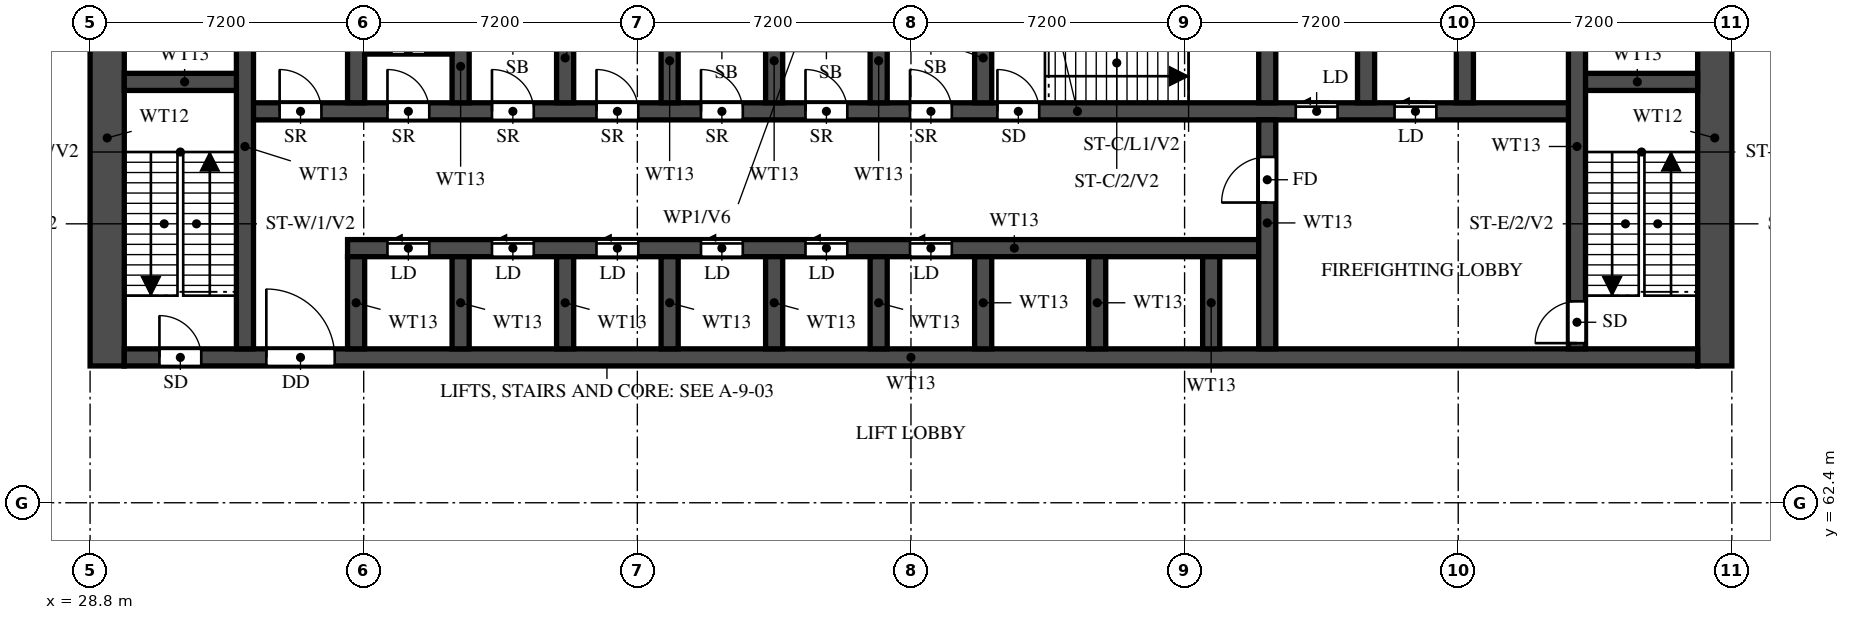
"""IFC4 building model, lengths in metres.
Left out: names, types, materials, properties, quantities, classifications, styles, units other than length and angle.
Written with IfcOpenShell. Run it as: python <this file> out.ifc"""

import sys

from ifc_helpers import new_model, si_unit, direction, frame, frame_2d, origin, place, context, subcontext, project, spatial, rectangle, extrude, element, fill, save


model = new_model("IFC4")
c1 = context("Model", 3, precision=1e-05, world=origin(), true_north=direction((0.0, 1.0)))
c2 = subcontext(c1, "Body", "Model", "MODEL_VIEW")
j1 = project(units=[si_unit("LENGTHUNIT", "METRE"), si_unit("PLANEANGLEUNIT", "RADIAN")], contexts=[c1])
p1 = place(None, origin())
s1 = spatial("IfcSite", under=j1, at=p1, CompositionType="ELEMENT")
p2 = place(p1, origin())
s2 = spatial("IfcBuilding", under=s1, at=p2, CompositionType="ELEMENT")
p3 = place(p2, frame((0.0, 0.0, 7.8)))
s3 = spatial("IfcBuildingStorey", under=s2, at=p3, CompositionType="ELEMENT", Elevation=7.8)
for number, where, z_axis, x_axis in (
    (1, (29.25, 66.0, 0.0), (0.0, 0.0, 1.0), (0.0, 1.0, 0.0)),
    (2, (71.55, 66.0, 0.0), (0.0, 0.0, 1.0), (0.0, 1.0, 0.0)),
):
    element("IfcWall", number, at=place(p3, frame(where, z_axis=z_axis, x_axis=x_axis)), inside=s3, PredefinedType="SHEAR", context=c2, shape_type="SweptSolid", body=[
        extrude(rectangle(XDim=12.0, YDim=0.9, at=frame_2d((6.0, 0.0))), origin(), (0.0, 0.0, 1.0), 5.0),
    ])
p4 = place(p3, frame((29.7, 66.225, 0.0), z_axis=(0.0, 0.0, 1.0), x_axis=(1.0, 0.0, 0.0)))
e3 = element("IfcWall", 3, at=p4, inside=s3, PredefinedType="SHEAR", context=c2, shape_type="SweptSolid", body=[
    extrude(rectangle(XDim=41.4, YDim=0.45, at=frame_2d((20.7, 0.0))), origin(), (0.0, 0.0, 1.0), 5.0),
])
p5 = place(p4, frame((0.925, 0.0, 0.0)))
e4 = element("IfcOpeningElement", 4, at=p5, cuts=e3, PredefinedType="OPENING", context=c2, shape_type="SweptSolid", body=[
    extrude(rectangle(XDim=1.1, YDim=2.1, at=frame_2d((0.55, 1.05))), frame((0.0, 0.235, 0.0), z_axis=(0.0, -1.0, 0.0), x_axis=(1.0, 0.0, 0.0)), (0.0, 0.0, 1.0), 0.47),
])
p6 = place(p4, frame((3.738, 0.0, 0.0)))
e5 = element("IfcOpeningElement", 5, at=p6, cuts=e3, PredefinedType="OPENING", context=c2, shape_type="SweptSolid", body=[
    extrude(rectangle(XDim=1.8, YDim=2.1, at=frame_2d((0.9, 1.05))), frame((0.0, 0.235, 0.0), z_axis=(0.0, -1.0, 0.0), x_axis=(1.0, 0.0, 0.0)), (0.0, 0.0, 1.0), 0.47),
])
p7 = place(p3, frame((35.575, 69.1, 0.0), z_axis=(0.0, 0.0, 1.0), x_axis=(1.0, 0.0, 0.0)))
e6 = element("IfcWall", 6, at=p7, inside=s3, PredefinedType="SHEAR", context=c2, shape_type="SweptSolid", body=[
    extrude(rectangle(XDim=24.2, YDim=0.45, at=frame_2d((12.1, 0.0))), origin(), (0.0, 0.0, 1.0), 5.0),
])
p8 = place(p7, frame((1.05, 0.0, 0.0)))
e7 = element("IfcOpeningElement", 7, at=p8, cuts=e6, PredefinedType="OPENING", context=c2, shape_type="SweptSolid", body=[
    extrude(rectangle(XDim=1.1, YDim=2.1, at=frame_2d((0.55, 1.05))), frame((0.0, 0.235, 0.0), z_axis=(0.0, -1.0, 0.0), x_axis=(1.0, 0.0, 0.0)), (0.0, 0.0, 1.0), 0.47),
])
p9 = place(p7, frame((3.8, 0.0, 0.0)))
e8 = element("IfcOpeningElement", 8, at=p9, cuts=e6, PredefinedType="OPENING", context=c2, shape_type="SweptSolid", body=[
    extrude(rectangle(XDim=1.1, YDim=2.1, at=frame_2d((0.55, 1.05))), frame((0.0, 0.235, 0.0), z_axis=(0.0, -1.0, 0.0), x_axis=(1.0, 0.0, 0.0)), (0.0, 0.0, 1.0), 0.47),
])
p10 = place(p7, frame((6.55, 0.0, 0.0)))
e9 = element("IfcOpeningElement", 9, at=p10, cuts=e6, PredefinedType="OPENING", context=c2, shape_type="SweptSolid", body=[
    extrude(rectangle(XDim=1.1, YDim=2.1, at=frame_2d((0.55, 1.05))), frame((0.0, 0.235, 0.0), z_axis=(0.0, -1.0, 0.0), x_axis=(1.0, 0.0, 0.0)), (0.0, 0.0, 1.0), 0.47),
])
p11 = place(p7, frame((9.3, 0.0, 0.0)))
e10 = element("IfcOpeningElement", 10, at=p11, cuts=e6, PredefinedType="OPENING", context=c2, shape_type="SweptSolid", body=[
    extrude(rectangle(XDim=1.1, YDim=2.1, at=frame_2d((0.55, 1.05))), frame((0.0, 0.235, 0.0), z_axis=(0.0, -1.0, 0.0), x_axis=(1.0, 0.0, 0.0)), (0.0, 0.0, 1.0), 0.47),
])
p12 = place(p7, frame((12.05, 0.0, 0.0)))
e11 = element("IfcOpeningElement", 11, at=p12, cuts=e6, PredefinedType="OPENING", context=c2, shape_type="SweptSolid", body=[
    extrude(rectangle(XDim=1.1, YDim=2.1, at=frame_2d((0.55, 1.05))), frame((0.0, 0.235, 0.0), z_axis=(0.0, -1.0, 0.0), x_axis=(1.0, 0.0, 0.0)), (0.0, 0.0, 1.0), 0.47),
])
p13 = place(p7, frame((14.8, 0.0, 0.0)))
e12 = element("IfcOpeningElement", 12, at=p13, cuts=e6, PredefinedType="OPENING", context=c2, shape_type="SweptSolid", body=[
    extrude(rectangle(XDim=1.1, YDim=2.1, at=frame_2d((0.55, 1.05))), frame((0.0, 0.235, 0.0), z_axis=(0.0, -1.0, 0.0), x_axis=(1.0, 0.0, 0.0)), (0.0, 0.0, 1.0), 0.47),
])
p14 = place(p3, frame((32.875, 72.7, 0.0), z_axis=(0.0, 0.0, 1.0), x_axis=(1.0, 0.0, 0.0)))
e13 = element("IfcWall", 13, at=p14, inside=s3, PredefinedType="SHEAR", context=c2, shape_type="SweptSolid", body=[
    extrude(rectangle(XDim=35.05, YDim=0.45, at=frame_2d((17.525, 0.0))), origin(), (0.0, 0.0, 1.0), 5.0),
])
p15 = place(p14, frame((19.8, 0.0, 0.0)))
e14 = element("IfcOpeningElement", 14, at=p15, cuts=e13, PredefinedType="OPENING", context=c2, shape_type="SweptSolid", body=[
    extrude(rectangle(XDim=1.1, YDim=2.1, at=frame_2d((0.55, 1.05))), frame((0.0, 0.235, 0.0), z_axis=(0.0, -1.0, 0.0), x_axis=(1.0, 0.0, 0.0)), (0.0, 0.0, 1.0), 0.47),
])
p16 = place(p14, frame((27.65, 0.0, 0.0)))
e15 = element("IfcOpeningElement", 15, at=p16, cuts=e13, PredefinedType="OPENING", context=c2, shape_type="SweptSolid", body=[
    extrude(rectangle(XDim=1.1, YDim=2.1, at=frame_2d((0.55, 1.05))), frame((0.0, 0.235, 0.0), z_axis=(0.0, -1.0, 0.0), x_axis=(1.0, 0.0, 0.0)), (0.0, 0.0, 1.0), 0.47),
])
p17 = place(p14, frame((30.25, 0.0, 0.0)))
e16 = element("IfcOpeningElement", 16, at=p17, cuts=e13, PredefinedType="OPENING", context=c2, shape_type="SweptSolid", body=[
    extrude(rectangle(XDim=1.1, YDim=2.1, at=frame_2d((0.55, 1.05))), frame((0.0, 0.235, 0.0), z_axis=(0.0, -1.0, 0.0), x_axis=(1.0, 0.0, 0.0)), (0.0, 0.0, 1.0), 0.47),
])
p18 = place(p14, frame((3.75, 0.0, 0.0)))
e17 = element("IfcOpeningElement", 17, at=p18, cuts=e13, PredefinedType="OPENING", context=c2, shape_type="SweptSolid", body=[
    extrude(rectangle(XDim=1.1, YDim=2.1, at=frame_2d((0.55, 1.05))), frame((0.0, 0.235, 0.0), z_axis=(0.0, -1.0, 0.0), x_axis=(1.0, 0.0, 0.0)), (0.0, 0.0, 1.0), 0.47),
])
p19 = place(p14, frame((6.5, 0.0, 0.0)))
e18 = element("IfcOpeningElement", 18, at=p19, cuts=e13, PredefinedType="OPENING", context=c2, shape_type="SweptSolid", body=[
    extrude(rectangle(XDim=1.1, YDim=2.1, at=frame_2d((0.55, 1.05))), frame((0.0, 0.235, 0.0), z_axis=(0.0, -1.0, 0.0), x_axis=(1.0, 0.0, 0.0)), (0.0, 0.0, 1.0), 0.47),
])
p20 = place(p14, frame((9.25, 0.0, 0.0)))
e19 = element("IfcOpeningElement", 19, at=p20, cuts=e13, PredefinedType="OPENING", context=c2, shape_type="SweptSolid", body=[
    extrude(rectangle(XDim=1.1, YDim=2.1, at=frame_2d((0.55, 1.05))), frame((0.0, 0.235, 0.0), z_axis=(0.0, -1.0, 0.0), x_axis=(1.0, 0.0, 0.0)), (0.0, 0.0, 1.0), 0.47),
])
p21 = place(p14, frame((12.0, 0.0, 0.0)))
e20 = element("IfcOpeningElement", 20, at=p21, cuts=e13, PredefinedType="OPENING", context=c2, shape_type="SweptSolid", body=[
    extrude(rectangle(XDim=1.1, YDim=2.1, at=frame_2d((0.55, 1.05))), frame((0.0, 0.235, 0.0), z_axis=(0.0, -1.0, 0.0), x_axis=(1.0, 0.0, 0.0)), (0.0, 0.0, 1.0), 0.47),
])
p22 = place(p14, frame((14.75, 0.0, 0.0)))
e21 = element("IfcOpeningElement", 21, at=p22, cuts=e13, PredefinedType="OPENING", context=c2, shape_type="SweptSolid", body=[
    extrude(rectangle(XDim=1.1, YDim=2.1, at=frame_2d((0.55, 1.05))), frame((0.0, 0.235, 0.0), z_axis=(0.0, -1.0, 0.0), x_axis=(1.0, 0.0, 0.0)), (0.0, 0.0, 1.0), 0.47),
])
p23 = place(p14, frame((17.5, 0.0, 0.0)))
e22 = element("IfcOpeningElement", 22, at=p23, cuts=e13, PredefinedType="OPENING", context=c2, shape_type="SweptSolid", body=[
    extrude(rectangle(XDim=1.1, YDim=2.1, at=frame_2d((0.55, 1.05))), frame((0.0, 0.235, 0.0), z_axis=(0.0, -1.0, 0.0), x_axis=(1.0, 0.0, 0.0)), (0.0, 0.0, 1.0), 0.47),
])
p24 = place(p14, frame((0.913, 0.0, 0.0)))
e23 = element("IfcOpeningElement", 23, at=p24, cuts=e13, PredefinedType="OPENING", context=c2, shape_type="SweptSolid", body=[
    extrude(rectangle(XDim=1.1, YDim=2.1, at=frame_2d((0.55, 1.05))), frame((0.0, 0.235, 0.0), z_axis=(0.0, -1.0, 0.0), x_axis=(1.0, 0.0, 0.0)), (0.0, 0.0, 1.0), 0.47),
])
for number, where, z_axis, x_axis in (
    (24, (29.7, 73.475, 0.0), (0.0, 0.0, 1.0), (1.0, 0.0, 0.0)),
    (25, (67.925, 73.475, 0.0), (0.0, 0.0, 1.0), (1.0, 0.0, 0.0)),
):
    element("IfcWall", number, at=place(p3, frame(where, z_axis=z_axis, x_axis=x_axis)), inside=s3, PredefinedType="SHEAR", context=c2, shape_type="SweptSolid", body=[
        extrude(rectangle(XDim=3.175, YDim=0.45, at=frame_2d((1.587, 0.0))), origin(), (0.0, 0.0, 1.0), 5.0),
    ])
p25 = place(p3, frame((32.875, 66.45, 0.0), z_axis=(0.0, 0.0, 1.0), x_axis=(0.0, 1.0, 0.0)))
e26 = element("IfcWall", 26, at=p25, inside=s3, PredefinedType="SHEAR", context=c2, shape_type="SweptSolid", body=[
    extrude(rectangle(XDim=10.65, YDim=0.45, at=frame_2d((5.325, 0.0))), origin(), (0.0, 0.0, 1.0), 5.0),
])
p26 = place(p3, frame((67.925, 66.45, 0.0), z_axis=(0.0, 0.0, 1.0), x_axis=(0.0, 1.0, 0.0)))
e27 = element("IfcWall", 27, at=p26, inside=s3, PredefinedType="SHEAR", context=c2, shape_type="SweptSolid", body=[
    extrude(rectangle(XDim=10.65, YDim=0.45, at=frame_2d((5.325, 0.0))), origin(), (0.0, 0.0, 1.0), 5.0),
])
p27 = place(p26, frame((0.15, 0.0, 0.0)))
e28 = element("IfcOpeningElement", 28, at=p27, cuts=e27, PredefinedType="OPENING", context=c2, shape_type="SweptSolid", body=[
    extrude(rectangle(XDim=1.1, YDim=2.1, at=frame_2d((0.55, 1.05))), frame((0.0, 0.235, 0.0), z_axis=(0.0, -1.0, 0.0), x_axis=(1.0, 0.0, 0.0)), (0.0, 0.0, 1.0), 0.47),
])
p28 = place(p3, frame((59.775, 66.45, 0.0), z_axis=(0.0, 0.0, 1.0), x_axis=(0.0, 1.0, 0.0)))
e29 = element("IfcWall", 29, at=p28, inside=s3, PredefinedType="SHEAR", context=c2, shape_type="SweptSolid", body=[
    extrude(rectangle(XDim=6.025, YDim=0.45, at=frame_2d((3.013, 0.0))), origin(), (0.0, 0.0, 1.0), 5.0),
])
p29 = place(p28, frame((3.85, 0.0, 0.0)))
e30 = element("IfcOpeningElement", 30, at=p29, cuts=e29, PredefinedType="OPENING", context=c2, shape_type="SweptSolid", body=[
    extrude(rectangle(XDim=1.2, YDim=2.1, at=frame_2d((0.6, 1.05))), frame((0.0, 0.235, 0.0), z_axis=(0.0, -1.0, 0.0), x_axis=(1.0, 0.0, 0.0)), (0.0, 0.0, 1.0), 0.47),
])
p30 = place(p3, frame((59.775, 72.925, 0.0), z_axis=(0.0, 0.0, 1.0), x_axis=(0.0, 1.0, 0.0)))
e31 = element("IfcWall", 31, at=p30, inside=s3, PredefinedType="SHEAR", context=c2, shape_type="SweptSolid", body=[
    extrude(rectangle(XDim=2.95, YDim=0.45, at=frame_2d((1.475, 0.0))), origin(), (0.0, 0.0, 1.0), 5.0),
])
for number, where, z_axis, x_axis in (
    (32, (35.8, 66.45, 0.0), (0.0, 0.0, 1.0), (0.0, 1.0, 0.0)),
    (33, (38.55, 66.45, 0.0), (0.0, 0.0, 1.0), (0.0, 1.0, 0.0)),
    (34, (41.3, 66.45, 0.0), (0.0, 0.0, 1.0), (0.0, 1.0, 0.0)),
    (35, (44.05, 66.45, 0.0), (0.0, 0.0, 1.0), (0.0, 1.0, 0.0)),
    (36, (46.8, 66.45, 0.0), (0.0, 0.0, 1.0), (0.0, 1.0, 0.0)),
    (37, (49.55, 66.45, 0.0), (0.0, 0.0, 1.0), (0.0, 1.0, 0.0)),
    (38, (52.3, 66.45, 0.0), (0.0, 0.0, 1.0), (0.0, 1.0, 0.0)),
    (39, (55.3, 66.45, 0.0), (0.0, 0.0, 1.0), (0.0, 1.0, 0.0)),
    (40, (58.3, 66.45, 0.0), (0.0, 0.0, 1.0), (0.0, 1.0, 0.0)),
):
    element("IfcWall", number, at=place(p3, frame(where, z_axis=z_axis, x_axis=x_axis)), inside=s3, PredefinedType="SHEAR", context=c2, shape_type="SweptSolid", body=[
        extrude(rectangle(XDim=2.425, YDim=0.45, at=frame_2d((1.212, 0.0))), origin(), (0.0, 0.0, 1.0), 5.0),
    ])
for number, where, z_axis, x_axis in (
    (41, (35.8, 72.925, 0.0), (0.0, 0.0, 1.0), (0.0, 1.0, 0.0)),
    (42, (38.55, 72.925, 0.0), (0.0, 0.0, 1.0), (0.0, 1.0, 0.0)),
    (43, (41.3, 72.925, 0.0), (0.0, 0.0, 1.0), (0.0, 1.0, 0.0)),
    (44, (44.05, 72.925, 0.0), (0.0, 0.0, 1.0), (0.0, 1.0, 0.0)),
    (45, (46.8, 72.925, 0.0), (0.0, 0.0, 1.0), (0.0, 1.0, 0.0)),
    (46, (49.55, 72.925, 0.0), (0.0, 0.0, 1.0), (0.0, 1.0, 0.0)),
    (47, (52.3, 72.925, 0.0), (0.0, 0.0, 1.0), (0.0, 1.0, 0.0)),
    (48, (62.375, 72.925, 0.0), (0.0, 0.0, 1.0), (0.0, 1.0, 0.0)),
    (49, (64.975, 72.925, 0.0), (0.0, 0.0, 1.0), (0.0, 1.0, 0.0)),
):
    element("IfcWall", number, at=place(p3, frame(where, z_axis=z_axis, x_axis=x_axis)), inside=s3, PredefinedType="SHEAR", context=c2, shape_type="SweptSolid", body=[
        extrude(rectangle(XDim=2.95, YDim=0.45, at=frame_2d((1.475, 0.0))), origin(), (0.0, 0.0, 1.0), 5.0),
    ])
p31 = place(p3, frame((36.025, 74.282, 0.0), z_axis=(0.0, 0.0, 1.0), x_axis=(1.0, 0.0, 0.0)))
e50 = element("IfcWall", 50, at=p31, inside=s3, PredefinedType="PARTITIONING", context=c2, shape_type="SweptSolid", body=[
    extrude(rectangle(XDim=2.3, YDim=0.15, at=frame_2d((1.15, 0.0))), origin(), (0.0, 0.0, 1.0), 5.0),
])
p32 = place(p31, frame((0.7, 0.0, 0.0)))
e51 = element("IfcOpeningElement", 51, at=p32, cuts=e50, PredefinedType="OPENING", context=c2, shape_type="SweptSolid", body=[
    extrude(rectangle(XDim=0.9, YDim=2.1, at=frame_2d((0.45, 1.05))), frame((0.0, 0.085, 0.0), z_axis=(0.0, -1.0, 0.0), x_axis=(1.0, 0.0, 0.0)), (0.0, 0.0, 1.0), 0.17),
])
p33 = place(p5, origin())
e52 = element("IfcDoor", 52, at=p33, inside=s3, OperationType="SINGLE_SWING_LEFT", PredefinedType="DOOR", context=c2, shape_type="SweptSolid", body=[
    extrude(rectangle(XDim=1.1, YDim=2.1, at=frame_2d((0.55, 1.05))), frame((0.0, 0.025, 0.0), z_axis=(0.0, -1.0, 0.0), x_axis=(1.0, 0.0, 0.0)), (0.0, 0.0, 1.0), 0.05),
])
fill(e4, e52)
p34 = place(p15, origin())
e53 = element("IfcDoor", 53, at=p34, inside=s3, OperationType="SINGLE_SWING_LEFT", PredefinedType="DOOR", context=c2, shape_type="SweptSolid", body=[
    extrude(rectangle(XDim=1.1, YDim=2.1, at=frame_2d((0.55, 1.05))), frame((0.0, 0.025, 0.0), z_axis=(0.0, -1.0, 0.0), x_axis=(1.0, 0.0, 0.0)), (0.0, 0.0, 1.0), 0.05),
])
fill(e14, e53)
p35 = place(p27, origin())
e54 = element("IfcDoor", 54, at=p35, inside=s3, OperationType="SINGLE_SWING_LEFT", PredefinedType="DOOR", context=c2, shape_type="SweptSolid", body=[
    extrude(rectangle(XDim=1.1, YDim=2.1, at=frame_2d((0.55, 1.05))), frame((0.0, 0.025, 0.0), z_axis=(0.0, -1.0, 0.0), x_axis=(1.0, 0.0, 0.0)), (0.0, 0.0, 1.0), 0.05),
])
fill(e28, e54)
p36 = place(p6, origin())
e55 = element("IfcDoor", 55, at=p36, inside=s3, OperationType="DOUBLE_DOOR_SINGLE_SWING", PredefinedType="DOOR", context=c2, shape_type="SweptSolid", body=[
    extrude(rectangle(XDim=1.8, YDim=2.1, at=frame_2d((0.9, 1.05))), frame((0.0, 0.025, 0.0), z_axis=(0.0, -1.0, 0.0), x_axis=(1.0, 0.0, 0.0)), (0.0, 0.0, 1.0), 0.05),
])
fill(e5, e55)
p37 = place(p29, origin())
e56 = element("IfcDoor", 56, at=p37, inside=s3, OperationType="SINGLE_SWING_RIGHT", PredefinedType="DOOR", context=c2, shape_type="SweptSolid", body=[
    extrude(rectangle(XDim=1.2, YDim=2.1, at=frame_2d((0.6, 1.05))), frame((0.0, 0.025, 0.0), z_axis=(0.0, -1.0, 0.0), x_axis=(1.0, 0.0, 0.0)), (0.0, 0.0, 1.0), 0.05),
])
fill(e30, e56)
p38 = place(p16, origin())
e57 = element("IfcDoor", 57, at=p38, inside=s3, OperationType="SLIDING_TO_LEFT", PredefinedType="DOOR", context=c2, shape_type="SweptSolid", body=[
    extrude(rectangle(XDim=1.1, YDim=2.1, at=frame_2d((0.55, 1.05))), frame((0.0, 0.025, 0.0), z_axis=(0.0, -1.0, 0.0), x_axis=(1.0, 0.0, 0.0)), (0.0, 0.0, 1.0), 0.05),
])
fill(e15, e57)
p39 = place(p17, origin())
e58 = element("IfcDoor", 58, at=p39, inside=s3, OperationType="SLIDING_TO_LEFT", PredefinedType="DOOR", context=c2, shape_type="SweptSolid", body=[
    extrude(rectangle(XDim=1.1, YDim=2.1, at=frame_2d((0.55, 1.05))), frame((0.0, 0.025, 0.0), z_axis=(0.0, -1.0, 0.0), x_axis=(1.0, 0.0, 0.0)), (0.0, 0.0, 1.0), 0.05),
])
fill(e16, e58)
p40 = place(p8, origin())
e59 = element("IfcDoor", 59, at=p40, inside=s3, OperationType="SLIDING_TO_LEFT", PredefinedType="DOOR", context=c2, shape_type="SweptSolid", body=[
    extrude(rectangle(XDim=1.1, YDim=2.1, at=frame_2d((0.55, 1.05))), frame((0.0, 0.025, 0.0), z_axis=(0.0, -1.0, 0.0), x_axis=(1.0, 0.0, 0.0)), (0.0, 0.0, 1.0), 0.05),
])
fill(e7, e59)
p41 = place(p9, origin())
e60 = element("IfcDoor", 60, at=p41, inside=s3, OperationType="SLIDING_TO_LEFT", PredefinedType="DOOR", context=c2, shape_type="SweptSolid", body=[
    extrude(rectangle(XDim=1.1, YDim=2.1, at=frame_2d((0.55, 1.05))), frame((0.0, 0.025, 0.0), z_axis=(0.0, -1.0, 0.0), x_axis=(1.0, 0.0, 0.0)), (0.0, 0.0, 1.0), 0.05),
])
fill(e8, e60)
p42 = place(p10, origin())
e61 = element("IfcDoor", 61, at=p42, inside=s3, OperationType="SLIDING_TO_LEFT", PredefinedType="DOOR", context=c2, shape_type="SweptSolid", body=[
    extrude(rectangle(XDim=1.1, YDim=2.1, at=frame_2d((0.55, 1.05))), frame((0.0, 0.025, 0.0), z_axis=(0.0, -1.0, 0.0), x_axis=(1.0, 0.0, 0.0)), (0.0, 0.0, 1.0), 0.05),
])
fill(e9, e61)
p43 = place(p11, origin())
e62 = element("IfcDoor", 62, at=p43, inside=s3, OperationType="SLIDING_TO_LEFT", PredefinedType="DOOR", context=c2, shape_type="SweptSolid", body=[
    extrude(rectangle(XDim=1.1, YDim=2.1, at=frame_2d((0.55, 1.05))), frame((0.0, 0.025, 0.0), z_axis=(0.0, -1.0, 0.0), x_axis=(1.0, 0.0, 0.0)), (0.0, 0.0, 1.0), 0.05),
])
fill(e10, e62)
p44 = place(p12, origin())
e63 = element("IfcDoor", 63, at=p44, inside=s3, OperationType="SLIDING_TO_LEFT", PredefinedType="DOOR", context=c2, shape_type="SweptSolid", body=[
    extrude(rectangle(XDim=1.1, YDim=2.1, at=frame_2d((0.55, 1.05))), frame((0.0, 0.025, 0.0), z_axis=(0.0, -1.0, 0.0), x_axis=(1.0, 0.0, 0.0)), (0.0, 0.0, 1.0), 0.05),
])
fill(e11, e63)
p45 = place(p13, origin())
e64 = element("IfcDoor", 64, at=p45, inside=s3, OperationType="SLIDING_TO_LEFT", PredefinedType="DOOR", context=c2, shape_type="SweptSolid", body=[
    extrude(rectangle(XDim=1.1, YDim=2.1, at=frame_2d((0.55, 1.05))), frame((0.0, 0.025, 0.0), z_axis=(0.0, -1.0, 0.0), x_axis=(1.0, 0.0, 0.0)), (0.0, 0.0, 1.0), 0.05),
])
fill(e12, e64)
p46 = place(p18, origin())
e65 = element("IfcDoor", 65, at=p46, inside=s3, OperationType="SINGLE_SWING_LEFT", PredefinedType="DOOR", context=c2, shape_type="SweptSolid", body=[
    extrude(rectangle(XDim=1.1, YDim=2.1, at=frame_2d((0.55, 1.05))), frame((0.0, 0.025, 0.0), z_axis=(0.0, -1.0, 0.0), x_axis=(1.0, 0.0, 0.0)), (0.0, 0.0, 1.0), 0.05),
])
fill(e17, e65)
p47 = place(p19, origin())
e66 = element("IfcDoor", 66, at=p47, inside=s3, OperationType="SINGLE_SWING_LEFT", PredefinedType="DOOR", context=c2, shape_type="SweptSolid", body=[
    extrude(rectangle(XDim=1.1, YDim=2.1, at=frame_2d((0.55, 1.05))), frame((0.0, 0.025, 0.0), z_axis=(0.0, -1.0, 0.0), x_axis=(1.0, 0.0, 0.0)), (0.0, 0.0, 1.0), 0.05),
])
fill(e18, e66)
p48 = place(p20, origin())
e67 = element("IfcDoor", 67, at=p48, inside=s3, OperationType="SINGLE_SWING_LEFT", PredefinedType="DOOR", context=c2, shape_type="SweptSolid", body=[
    extrude(rectangle(XDim=1.1, YDim=2.1, at=frame_2d((0.55, 1.05))), frame((0.0, 0.025, 0.0), z_axis=(0.0, -1.0, 0.0), x_axis=(1.0, 0.0, 0.0)), (0.0, 0.0, 1.0), 0.05),
])
fill(e19, e67)
p49 = place(p21, origin())
e68 = element("IfcDoor", 68, at=p49, inside=s3, OperationType="SINGLE_SWING_LEFT", PredefinedType="DOOR", context=c2, shape_type="SweptSolid", body=[
    extrude(rectangle(XDim=1.1, YDim=2.1, at=frame_2d((0.55, 1.05))), frame((0.0, 0.025, 0.0), z_axis=(0.0, -1.0, 0.0), x_axis=(1.0, 0.0, 0.0)), (0.0, 0.0, 1.0), 0.05),
])
fill(e20, e68)
p50 = place(p22, origin())
e69 = element("IfcDoor", 69, at=p50, inside=s3, OperationType="SINGLE_SWING_LEFT", PredefinedType="DOOR", context=c2, shape_type="SweptSolid", body=[
    extrude(rectangle(XDim=1.1, YDim=2.1, at=frame_2d((0.55, 1.05))), frame((0.0, 0.025, 0.0), z_axis=(0.0, -1.0, 0.0), x_axis=(1.0, 0.0, 0.0)), (0.0, 0.0, 1.0), 0.05),
])
fill(e21, e69)
p51 = place(p23, origin())
e70 = element("IfcDoor", 70, at=p51, inside=s3, OperationType="SINGLE_SWING_LEFT", PredefinedType="DOOR", context=c2, shape_type="SweptSolid", body=[
    extrude(rectangle(XDim=1.1, YDim=2.1, at=frame_2d((0.55, 1.05))), frame((0.0, 0.025, 0.0), z_axis=(0.0, -1.0, 0.0), x_axis=(1.0, 0.0, 0.0)), (0.0, 0.0, 1.0), 0.05),
])
fill(e22, e70)
p52 = place(p24, origin())
e71 = element("IfcDoor", 71, at=p52, inside=s3, OperationType="SINGLE_SWING_LEFT", PredefinedType="DOOR", context=c2, shape_type="SweptSolid", body=[
    extrude(rectangle(XDim=1.1, YDim=2.1, at=frame_2d((0.55, 1.05))), frame((0.0, 0.025, 0.0), z_axis=(0.0, -1.0, 0.0), x_axis=(1.0, 0.0, 0.0)), (0.0, 0.0, 1.0), 0.05),
])
fill(e23, e71)
save(model, sys.argv[1])
